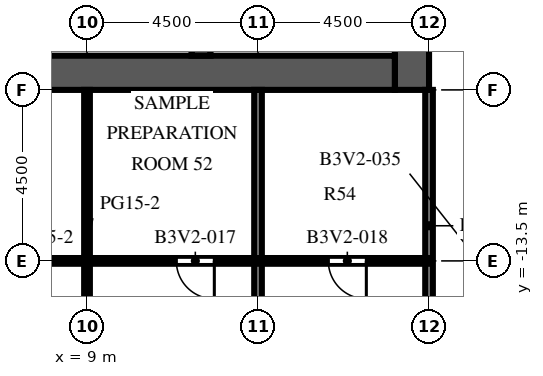
"""IFC4 building model, lengths in metres.
Left out: names, types, materials, properties, quantities, classifications, styles, units other than length and angle.
Written with IfcOpenShell. Run it as: python <this file> out.ifc"""

import sys

from ifc_helpers import new_model, si_unit, direction, frame, frame_2d, origin, place, context, subcontext, project, spatial, rectangle, extrude, element, fill, save


model = new_model("IFC4")
c1 = context("Model", 3, precision=1e-05, world=origin(), true_north=direction((0.0, 1.0)))
c2 = subcontext(c1, "Body", "Model", "MODEL_VIEW")
j1 = project(units=[si_unit("LENGTHUNIT", "METRE"), si_unit("PLANEANGLEUNIT", "RADIAN")], contexts=[c1])
p1 = place(None, origin())
s1 = spatial("IfcSite", under=j1, at=p1, CompositionType="ELEMENT")
p2 = place(p1, origin())
s2 = spatial("IfcBuilding", under=s1, at=p2, CompositionType="ELEMENT")
p3 = place(p2, frame((0.0, 0.0, 106.6)))
s3 = spatial("IfcBuildingStorey", under=s2, at=p3, CompositionType="ELEMENT", Elevation=106.6)
p4 = place(p3, frame((17.55, -9.0, 0.0), z_axis=(0.0, 0.0, 1.0), x_axis=(0.0, 1.0, 0.0)))
e1 = element("IfcWall", 1, at=p4, inside=s3, PredefinedType="SHEAR", context=c2, shape_type="SweptSolid", body=[
    extrude(rectangle(XDim=27.5, YDim=0.9, at=frame_2d((13.75, 0.0))), origin(), (0.0, 0.0, 1.0), 4.1),
])
p5 = place(p4, frame((12.55, 0.0, 0.0)))
e2 = element("IfcOpeningElement", 2, at=p5, cuts=e1, PredefinedType="OPENING", context=c2, shape_type="SweptSolid", body=[
    extrude(rectangle(XDim=2.4, YDim=2.4, at=frame_2d((1.2, 1.2))), frame((0.0, 0.46, 0.0), z_axis=(0.0, -1.0, 0.0), x_axis=(1.0, 0.0, 0.0)), (0.0, 0.0, 1.0), 0.92),
])
p6 = place(p4, frame((6.825, 0.0, 0.0)))
e3 = element("IfcOpeningElement", 3, at=p6, cuts=e1, PredefinedType="OPENING", context=c2, shape_type="SweptSolid", body=[
    extrude(rectangle(XDim=1.2, YDim=2.1, at=frame_2d((0.6, 1.05))), frame((0.0, 0.46, 0.0), z_axis=(0.0, -1.0, 0.0), x_axis=(1.0, 0.0, 0.0)), (0.0, 0.0, 1.0), 0.92),
])
p7 = place(p4, frame((19.475, 0.0, 0.0)))
e4 = element("IfcOpeningElement", 4, at=p7, cuts=e1, PredefinedType="OPENING", context=c2, shape_type="SweptSolid", body=[
    extrude(rectangle(XDim=1.2, YDim=2.1, at=frame_2d((0.6, 1.05))), frame((0.0, 0.46, 0.0), z_axis=(0.0, -1.0, 0.0), x_axis=(1.0, 0.0, 0.0)), (0.0, 0.0, 1.0), 0.92),
])
p8 = place(p3, frame((6.9, -8.55, 0.0), z_axis=(0.0, 0.0, 1.0), x_axis=(1.0, 0.0, 0.0)))
e5 = element("IfcWall", 5, at=p8, inside=s3, PredefinedType="SHEAR", context=c2, shape_type="SweptSolid", body=[
    extrude(rectangle(XDim=10.2, YDim=0.9, at=frame_2d((5.1, 0.0))), origin(), (0.0, 0.0, 1.0), 4.1),
])
p9 = place(p3, frame((12.0, -8.1, 0.0), z_axis=(0.0, 0.0, 1.0), x_axis=(0.0, 1.0, 0.0)))
e6 = element("IfcWall", 6, at=p9, inside=s3, PredefinedType="SHEAR", context=c2, shape_type="SweptSolid", body=[
    extrude(rectangle(XDim=7.35, YDim=0.5, at=frame_2d((3.675, 0.0))), origin(), (0.0, 0.0, 1.0), 4.1),
])
p10 = place(p3, frame((9.0, -17.3, 0.0), z_axis=(0.0, 0.0, 1.0), x_axis=(0.0, 1.0, 0.0)))
e7 = element("IfcWall", 7, at=p10, inside=s3, PredefinedType="PARTITIONING", context=c2, shape_type="SweptSolid", body=[
    extrude(rectangle(XDim=8.3, YDim=0.15, at=frame_2d((4.15, 0.0))), origin(), (0.0, 0.0, 1.0), 3.5),
])
p11 = place(p3, frame((13.5, -21.9, 0.0), z_axis=(0.0, 0.0, 1.0), x_axis=(0.0, 1.0, 0.0)))
e8 = element("IfcWall", 8, at=p11, inside=s3, PredefinedType="PARTITIONING", context=c2, shape_type="SweptSolid", body=[
    extrude(rectangle(XDim=12.9, YDim=0.2, at=frame_2d((6.45, 0.0))), origin(), (0.0, 0.0, 1.0), 3.5),
])
p12 = place(p3, frame((18.0, -17.3, 0.0), z_axis=(0.0, 0.0, 1.0), x_axis=(0.0, 1.0, 0.0)))
e9 = element("IfcWall", 9, at=p12, inside=s3, PredefinedType="PARTITIONING", context=c2, shape_type="SweptSolid", body=[
    extrude(rectangle(XDim=8.3, YDim=0.2, at=frame_2d((4.15, 0.0))), origin(), (0.0, 0.0, 1.0), 3.5),
])
p13 = place(p12, frame((0.15, 0.0, 0.0)))
e10 = element("IfcOpeningElement", 10, at=p13, cuts=e9, PredefinedType="OPENING", context=c2, shape_type="SweptSolid", body=[
    extrude(rectangle(XDim=1.0, YDim=2.1, at=frame_2d((0.5, 1.05))), frame((0.0, 0.11, 0.0), z_axis=(0.0, -1.0, 0.0), x_axis=(1.0, 0.0, 0.0)), (0.0, 0.0, 1.0), 0.22),
])
p14 = place(p3, frame((-10.5, -13.5, 0.0), z_axis=(0.0, 0.0, 1.0), x_axis=(1.0, 0.0, 0.0)))
e11 = element("IfcWall", 11, at=p14, inside=s3, PredefinedType="PARTITIONING", context=c2, shape_type="SweptSolid", body=[
    extrude(rectangle(XDim=28.5, YDim=0.15, at=frame_2d((14.25, 0.0))), origin(), (0.0, 0.0, 1.0), 3.5),
])
p15 = place(p14, frame((3.1, 0.0, 0.0)))
e12 = element("IfcOpeningElement", 12, at=p15, cuts=e11, PredefinedType="OPENING", context=c2, shape_type="SweptSolid", body=[
    extrude(rectangle(XDim=1.0, YDim=2.1, at=frame_2d((0.5, 1.05))), frame((0.0, 0.085, 0.0), z_axis=(0.0, -1.0, 0.0), x_axis=(1.0, 0.0, 0.0)), (0.0, 0.0, 1.0), 0.17),
])
p16 = place(p14, frame((8.35, 0.0, 0.0)))
e13 = element("IfcOpeningElement", 13, at=p16, cuts=e11, PredefinedType="OPENING", context=c2, shape_type="SweptSolid", body=[
    extrude(rectangle(XDim=1.0, YDim=2.1, at=frame_2d((0.5, 1.05))), frame((0.0, 0.085, 0.0), z_axis=(0.0, -1.0, 0.0), x_axis=(1.0, 0.0, 0.0)), (0.0, 0.0, 1.0), 0.17),
])
p17 = place(p14, frame((13.85, 0.0, 0.0)))
e14 = element("IfcOpeningElement", 14, at=p17, cuts=e11, PredefinedType="OPENING", context=c2, shape_type="SweptSolid", body=[
    extrude(rectangle(XDim=1.0, YDim=2.1, at=frame_2d((0.5, 1.05))), frame((0.0, 0.085, 0.0), z_axis=(0.0, -1.0, 0.0), x_axis=(1.0, 0.0, 0.0)), (0.0, 0.0, 1.0), 0.17),
])
p18 = place(p14, frame((21.85, 0.0, 0.0)))
e15 = element("IfcOpeningElement", 15, at=p18, cuts=e11, PredefinedType="OPENING", context=c2, shape_type="SweptSolid", body=[
    extrude(rectangle(XDim=1.0, YDim=2.1, at=frame_2d((0.5, 1.05))), frame((0.0, 0.085, 0.0), z_axis=(0.0, -1.0, 0.0), x_axis=(1.0, 0.0, 0.0)), (0.0, 0.0, 1.0), 0.17),
])
p19 = place(p14, frame((25.85, 0.0, 0.0)))
e16 = element("IfcOpeningElement", 16, at=p19, cuts=e11, PredefinedType="OPENING", context=c2, shape_type="SweptSolid", body=[
    extrude(rectangle(XDim=1.0, YDim=2.1, at=frame_2d((0.5, 1.05))), frame((0.0, 0.085, 0.0), z_axis=(0.0, -1.0, 0.0), x_axis=(1.0, 0.0, 0.0)), (0.0, 0.0, 1.0), 0.17),
])
p20 = place(p18, origin())
e17 = element("IfcDoor", 17, at=p20, inside=s3, OperationType="SINGLE_SWING_RIGHT", PredefinedType="DOOR", context=c2, shape_type="SweptSolid", body=[
    extrude(rectangle(XDim=1.0, YDim=2.1, at=frame_2d((0.5, 1.05))), frame((0.0, 0.025, 0.0), z_axis=(0.0, -1.0, 0.0), x_axis=(1.0, 0.0, 0.0)), (0.0, 0.0, 1.0), 0.05),
])
fill(e15, e17)
p21 = place(p19, origin())
e18 = element("IfcDoor", 18, at=p21, inside=s3, OperationType="SINGLE_SWING_RIGHT", PredefinedType="DOOR", context=c2, shape_type="SweptSolid", body=[
    extrude(rectangle(XDim=1.0, YDim=2.1, at=frame_2d((0.5, 1.05))), frame((0.0, 0.025, 0.0), z_axis=(0.0, -1.0, 0.0), x_axis=(1.0, 0.0, 0.0)), (0.0, 0.0, 1.0), 0.05),
])
fill(e16, e18)
save(model, sys.argv[1])
